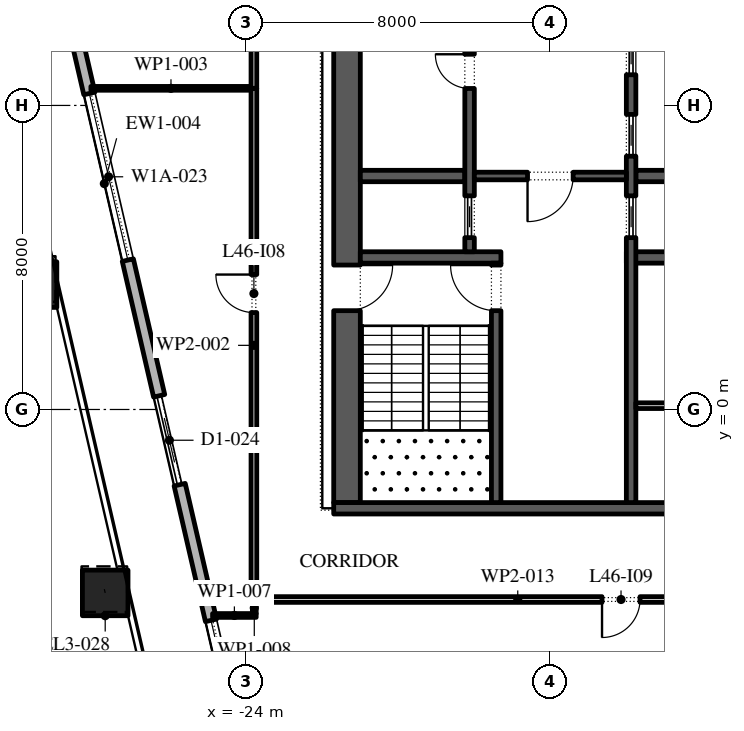
"""IFC4 building model, lengths in metres.
Left out: names, types, materials, properties, quantities, classifications, styles, units other than length and angle.
Written with IfcOpenShell. Run it as: python <this file> out.ifc"""

import sys

from ifc_helpers import new_model, si_unit, direction, frame, frame_2d, origin, origin_2d, place, context, subcontext, project, spatial, rectangle, extrude, element, fill, save


model = new_model("IFC4")
c1 = context("Model", 3, precision=1e-05, world=origin(), true_north=direction((0.0, 1.0)))
c2 = subcontext(c1, "Body", "Model", "MODEL_VIEW")
j1 = project(units=[si_unit("LENGTHUNIT", "METRE"), si_unit("PLANEANGLEUNIT", "RADIAN")], contexts=[c1])
p1 = place(None, origin())
s1 = spatial("IfcSite", under=j1, at=p1, CompositionType="ELEMENT")
p2 = place(p1, origin())
s2 = spatial("IfcBuilding", under=s1, at=p2, CompositionType="ELEMENT")
p3 = place(p2, frame((0.0, 0.0, 209.4)))
s3 = spatial("IfcBuildingStorey", under=s2, at=p3, CompositionType="ELEMENT", Elevation=209.4)
p4 = place(p3, frame((-29.586, 3.286, 0.0), z_axis=(-0.008074278456, 0.035085353866, 0.999351701841), x_axis=(-0.974526982896, -0.224270282488, 0.0)))
e1 = element("IfcColumn", 1, at=p4, inside=s3, PredefinedType="COLUMN", context=c2, shape_type="SweptSolid", body=[
    extrude(rectangle(XDim=1.2, YDim=1.2, at=origin_2d()), origin(), (0.0, 0.0, 1.0), 4.203),
])
p5 = place(p3, frame((-27.713, -4.826, 0.0), z_axis=(-0.005404165525, 0.0233599413, 0.999712512744), x_axis=(-0.974268511785, -0.225390476607, 0.0)))
e2 = element("IfcColumn", 2, at=p5, inside=s3, PredefinedType="COLUMN", context=c2, shape_type="SweptSolid", body=[
    extrude(rectangle(XDim=1.2, YDim=1.2, at=origin_2d()), origin(), (0.0, 0.0, 1.0), 4.201),
])
p6 = place(p3, frame((-33.157, 30.092, 0.0), z_axis=(0.0, 0.0, 1.0), x_axis=(0.224950279389, -0.974370243697, 0.0)))
e3 = element("IfcWall", 3, at=p6, inside=s3, PredefinedType="STANDARD", context=c2, shape_type="SweptSolid", body=[
    extrude(rectangle(XDim=49.5, YDim=0.3, at=frame_2d((24.75, 0.0))), origin(), (0.0, 0.0, 1.0), 4.0),
])
p7 = place(p6, frame((2.207, 0.0, 0.0)))
e4 = element("IfcOpeningElement", 4, at=p7, cuts=e3, PredefinedType="OPENING", context=c2, shape_type="SweptSolid", body=[
    extrude(rectangle(XDim=2.4, YDim=3.5, at=frame_2d((1.2, 1.75))), frame((0.0, 0.16, 0.0), z_axis=(0.0, -1.0, 0.0), x_axis=(1.0, 0.0, 0.0)), (0.0, 0.0, 1.0), 0.32),
])
p8 = place(p6, frame((8.121, 0.0, 0.45)))
e5 = element("IfcOpeningElement", 5, at=p8, cuts=e3, PredefinedType="OPENING", context=c2, shape_type="SweptSolid", body=[
    extrude(rectangle(XDim=4.5, YDim=2.825, at=frame_2d((2.25, 1.413))), frame((0.0, 0.16, 0.0), z_axis=(0.0, -1.0, 0.0), x_axis=(1.0, 0.0, 0.0)), (0.0, 0.0, 1.0), 0.32),
])
p9 = place(p6, frame((15.236, 0.0, 0.45)))
e6 = element("IfcOpeningElement", 6, at=p9, cuts=e3, PredefinedType="OPENING", context=c2, shape_type="SweptSolid", body=[
    extrude(rectangle(XDim=4.5, YDim=2.95, at=frame_2d((2.25, 1.475))), frame((0.0, 0.16, 0.0), z_axis=(0.0, -1.0, 0.0), x_axis=(1.0, 0.0, 0.0)), (0.0, 0.0, 1.0), 0.32),
])
p10 = place(p6, frame((22.35, 0.0, 0.45)))
e7 = element("IfcOpeningElement", 7, at=p10, cuts=e3, PredefinedType="OPENING", context=c2, shape_type="SweptSolid", body=[
    extrude(rectangle(XDim=4.5, YDim=3.0, at=frame_2d((2.25, 1.5))), frame((0.0, 0.16, 0.0), z_axis=(0.0, -1.0, 0.0), x_axis=(1.0, 0.0, 0.0)), (0.0, 0.0, 1.0), 0.32),
])
p11 = place(p6, frame((30.514, 0.0, 0.0)))
e8 = element("IfcOpeningElement", 8, at=p11, cuts=e3, PredefinedType="OPENING", context=c2, shape_type="SweptSolid", body=[
    extrude(rectangle(XDim=2.4, YDim=3.5, at=frame_2d((1.2, 1.75))), frame((0.0, 0.16, 0.0), z_axis=(0.0, -1.0, 0.0), x_axis=(1.0, 0.0, 0.0)), (0.0, 0.0, 1.0), 0.32),
])
p12 = place(p6, frame((36.579, 0.0, 0.45)))
e9 = element("IfcOpeningElement", 9, at=p12, cuts=e3, PredefinedType="OPENING", context=c2, shape_type="SweptSolid", body=[
    extrude(rectangle(XDim=4.5, YDim=3.05, at=frame_2d((2.25, 1.525))), frame((0.0, 0.16, 0.0), z_axis=(0.0, -1.0, 0.0), x_axis=(1.0, 0.0, 0.0)), (0.0, 0.0, 1.0), 0.32),
])
p13 = place(p6, frame((43.693, 0.0, 0.45)))
e10 = element("IfcOpeningElement", 10, at=p13, cuts=e3, PredefinedType="OPENING", context=c2, shape_type="SweptSolid", body=[
    extrude(rectangle(XDim=4.5, YDim=3.05, at=frame_2d((2.25, 1.525))), frame((0.0, 0.16, 0.0), z_axis=(0.0, -1.0, 0.0), x_axis=(1.0, 0.0, 0.0)), (0.0, 0.0, 1.0), 0.32),
])
p14 = place(p3, frame((-21.35, -2.45, 0.0), z_axis=(0.0, 0.0, 1.0), x_axis=(0.0, 1.0, 0.0)))
e11 = element("IfcWall", 11, at=p14, inside=s3, PredefinedType="SHEAR", context=c2, shape_type="SweptSolid", body=[
    extrude(rectangle(XDim=27.9, YDim=0.7, at=frame_2d((13.95, 0.0))), origin(), (0.0, 0.0, 1.0), 4.0),
])
p15 = place(p14, frame((5.05, 0.0, 0.0)))
e12 = element("IfcOpeningElement", 12, at=p15, cuts=e11, PredefinedType="OPENING", context=c2, shape_type="SweptSolid", body=[
    extrude(rectangle(XDim=1.2, YDim=2.1, at=frame_2d((0.6, 1.05))), frame((0.0, 0.36, 0.0), z_axis=(0.0, -1.0, 0.0), x_axis=(1.0, 0.0, 0.0)), (0.0, 0.0, 1.0), 0.72),
])
p16 = place(p14, frame((21.65, 0.0, 0.0)))
e13 = element("IfcOpeningElement", 13, at=p16, cuts=e11, PredefinedType="OPENING", context=c2, shape_type="SweptSolid", body=[
    extrude(rectangle(XDim=1.2, YDim=2.1, at=frame_2d((0.6, 1.05))), frame((0.0, 0.36, 0.0), z_axis=(0.0, -1.0, 0.0), x_axis=(1.0, 0.0, 0.0)), (0.0, 0.0, 1.0), 0.72),
])
p17 = place(p3, frame((-21.7, -2.6, 0.0), z_axis=(0.0, 0.0, 1.0), x_axis=(1.0, 0.0, 0.0)))
e14 = element("IfcWall", 14, at=p17, inside=s3, PredefinedType="SHEAR", context=c2, shape_type="SweptSolid", body=[
    extrude(rectangle(XDim=11.4, YDim=0.3, at=frame_2d((5.7, 0.0))), origin(), (0.0, 0.0, 1.0), 4.0),
])
p18 = place(p3, frame((-21.0, 4.0, 0.0), z_axis=(0.0, 0.0, 1.0), x_axis=(1.0, 0.0, 0.0)))
e15 = element("IfcWall", 15, at=p18, inside=s3, PredefinedType="SHEAR", context=c2, shape_type="SweptSolid", body=[
    extrude(rectangle(XDim=3.7, YDim=0.3, at=frame_2d((1.85, 0.0))), origin(), (0.0, 0.0, 1.0), 4.0),
])
p19 = place(p3, frame((-17.425, -2.45, 0.0), z_axis=(0.0, 0.0, 1.0), x_axis=(0.0, 1.0, 0.0)))
e16 = element("IfcWall", 16, at=p19, inside=s3, PredefinedType="SHEAR", context=c2, shape_type="SweptSolid", body=[
    extrude(rectangle(XDim=6.3, YDim=0.25, at=frame_2d((3.15, 0.0))), origin(), (0.0, 0.0, 1.0), 4.0),
])
p20 = place(p19, frame((5.05, 0.0, 0.0)))
e17 = element("IfcOpeningElement", 17, at=p20, cuts=e16, PredefinedType="OPENING", context=c2, shape_type="SweptSolid", body=[
    extrude(rectangle(XDim=1.2, YDim=2.1, at=frame_2d((0.6, 1.05))), frame((0.0, 0.135, 0.0), z_axis=(0.0, -1.0, 0.0), x_axis=(1.0, 0.0, 0.0)), (0.0, 0.0, 1.0), 0.27),
])
p21 = place(p3, frame((-21.0, 6.143, 0.0), z_axis=(0.0, 0.0, 1.0), x_axis=(1.0, 0.0, 0.0)))
e18 = element("IfcWall", 18, at=p21, inside=s3, PredefinedType="SHEAR", context=c2, shape_type="SweptSolid", body=[
    extrude(rectangle(XDim=2.75, YDim=0.3, at=frame_2d((1.375, 0.0))), origin(), (0.0, 0.0, 1.0), 4.0),
])
p22 = place(p3, frame((-18.125, 4.15, 0.0), z_axis=(0.0, 0.0, 1.0), x_axis=(0.0, 1.0, 0.0)))
e19 = element("IfcWall", 19, at=p22, inside=s3, PredefinedType="SHEAR", context=c2, shape_type="SweptSolid", body=[
    extrude(rectangle(XDim=14.7, YDim=0.25, at=frame_2d((7.35, 0.0))), origin(), (0.0, 0.0, 1.0), 4.0),
])
p23 = place(p22, frame((4.296, 0.0, 0.0)))
e20 = element("IfcOpeningElement", 20, at=p23, cuts=e19, PredefinedType="OPENING", context=c2, shape_type="SweptSolid", body=[
    extrude(rectangle(XDim=0.9, YDim=2.1, at=frame_2d((0.45, 1.05))), frame((0.0, 0.135, 0.0), z_axis=(0.0, -1.0, 0.0), x_axis=(1.0, 0.0, 0.0)), (0.0, 0.0, 1.0), 0.27),
])
p24 = place(p22, frame((9.504, 0.0, 0.0)))
e21 = element("IfcOpeningElement", 21, at=p24, cuts=e19, PredefinedType="OPENING", context=c2, shape_type="SweptSolid", body=[
    extrude(rectangle(XDim=0.9, YDim=2.1, at=frame_2d((0.45, 1.05))), frame((0.0, 0.135, 0.0), z_axis=(0.0, -1.0, 0.0), x_axis=(1.0, 0.0, 0.0)), (0.0, 0.0, 1.0), 0.27),
])
p25 = place(p22, frame((0.371, 0.0, 0.0)))
e22 = element("IfcOpeningElement", 22, at=p25, cuts=e19, PredefinedType="OPENING", context=c2, shape_type="SweptSolid", body=[
    extrude(rectangle(XDim=1.1, YDim=2.1, at=frame_2d((0.55, 1.05))), frame((0.0, 0.135, 0.0), z_axis=(0.0, -1.0, 0.0), x_axis=(1.0, 0.0, 0.0)), (0.0, 0.0, 1.0), 0.27),
])
p26 = place(p22, frame((13.229, 0.0, 0.0)))
e23 = element("IfcOpeningElement", 23, at=p26, cuts=e19, PredefinedType="OPENING", context=c2, shape_type="SweptSolid", body=[
    extrude(rectangle(XDim=1.1, YDim=2.1, at=frame_2d((0.55, 1.05))), frame((0.0, 0.135, 0.0), z_axis=(0.0, -1.0, 0.0), x_axis=(1.0, 0.0, 0.0)), (0.0, 0.0, 1.0), 0.27),
])
p27 = place(p3, frame((-14.0, 4.0, 0.0), z_axis=(0.0, 0.0, 1.0), x_axis=(1.0, 0.0, 0.0)))
e24 = element("IfcWall", 24, at=p27, inside=s3, PredefinedType="SHEAR", context=c2, shape_type="SweptSolid", body=[
    extrude(rectangle(XDim=3.0, YDim=0.3, at=frame_2d((1.5, 0.0))), origin(), (0.0, 0.0, 1.0), 4.0),
])
p28 = place(p3, frame((-13.75, 6.143, 0.0), z_axis=(0.0, 0.0, 1.0), x_axis=(1.0, 0.0, 0.0)))
e25 = element("IfcWall", 25, at=p28, inside=s3, PredefinedType="SHEAR", context=c2, shape_type="SweptSolid", body=[
    extrude(rectangle(XDim=2.75, YDim=0.3, at=frame_2d((1.375, 0.0))), origin(), (0.0, 0.0, 1.0), 4.0),
])
p29 = place(p3, frame((-13.875, -2.45, 0.0), z_axis=(0.0, 0.0, 1.0), x_axis=(0.0, 1.0, 0.0)))
e26 = element("IfcWall", 26, at=p29, inside=s3, PredefinedType="SHEAR", context=c2, shape_type="SweptSolid", body=[
    extrude(rectangle(XDim=21.3, YDim=0.25, at=frame_2d((10.65, 0.0))), origin(), (0.0, 0.0, 1.0), 4.0),
])
p30 = place(p29, frame((17.786, 0.0, 0.0)))
e27 = element("IfcOpeningElement", 27, at=p30, cuts=e26, PredefinedType="OPENING", context=c2, shape_type="SweptSolid", body=[
    extrude(rectangle(XDim=0.9, YDim=2.1, at=frame_2d((0.45, 1.05))), frame((0.0, 0.135, 0.0), z_axis=(0.0, -1.0, 0.0), x_axis=(1.0, 0.0, 0.0)), (0.0, 0.0, 1.0), 0.27),
])
p31 = place(p29, frame((6.971, 0.0, 0.0)))
e28 = element("IfcOpeningElement", 28, at=p31, cuts=e26, PredefinedType="OPENING", context=c2, shape_type="SweptSolid", body=[
    extrude(rectangle(XDim=1.1, YDim=2.1, at=frame_2d((0.55, 1.05))), frame((0.0, 0.135, 0.0), z_axis=(0.0, -1.0, 0.0), x_axis=(1.0, 0.0, 0.0)), (0.0, 0.0, 1.0), 0.27),
])
p32 = place(p29, frame((9.114, 0.0, 0.0)))
e29 = element("IfcOpeningElement", 29, at=p32, cuts=e26, PredefinedType="OPENING", context=c2, shape_type="SweptSolid", body=[
    extrude(rectangle(XDim=1.1, YDim=2.1, at=frame_2d((0.55, 1.05))), frame((0.0, 0.135, 0.0), z_axis=(0.0, -1.0, 0.0), x_axis=(1.0, 0.0, 0.0)), (0.0, 0.0, 1.0), 0.27),
])
p33 = place(p29, frame((11.257, 0.0, 0.0)))
e30 = element("IfcOpeningElement", 30, at=p33, cuts=e26, PredefinedType="OPENING", context=c2, shape_type="SweptSolid", body=[
    extrude(rectangle(XDim=1.1, YDim=2.1, at=frame_2d((0.55, 1.05))), frame((0.0, 0.135, 0.0), z_axis=(0.0, -1.0, 0.0), x_axis=(1.0, 0.0, 0.0)), (0.0, 0.0, 1.0), 0.27),
])
p34 = place(p29, frame((13.4, 0.0, 0.0)))
e31 = element("IfcOpeningElement", 31, at=p34, cuts=e26, PredefinedType="OPENING", context=c2, shape_type="SweptSolid", body=[
    extrude(rectangle(XDim=1.1, YDim=2.1, at=frame_2d((0.55, 1.05))), frame((0.0, 0.135, 0.0), z_axis=(0.0, -1.0, 0.0), x_axis=(1.0, 0.0, 0.0)), (0.0, 0.0, 1.0), 0.27),
])
p35 = place(p3, frame((-18.0, 6.143, 0.0), z_axis=(0.0, 0.0, 1.0), x_axis=(1.0, 0.0, 0.0)))
e32 = element("IfcWall", 32, at=p35, inside=s3, PredefinedType="SHEAR", context=c2, shape_type="SweptSolid", body=[
    extrude(rectangle(XDim=4.0, YDim=0.2, at=frame_2d((2.0, 0.0))), origin(), (0.0, 0.0, 1.0), 4.0),
])
p36 = place(p35, frame((1.4, 0.0, 0.0)))
e33 = element("IfcOpeningElement", 33, at=p36, cuts=e32, PredefinedType="OPENING", context=c2, shape_type="SweptSolid", body=[
    extrude(rectangle(XDim=1.2, YDim=2.1, at=frame_2d((0.6, 1.05))), frame((0.0, 0.11, 0.0), z_axis=(0.0, -1.0, 0.0), x_axis=(1.0, 0.0, 0.0)), (0.0, 0.0, 1.0), 0.22),
])
p37 = place(p3, frame((-13.75, 0.1, 0.0), z_axis=(0.0, 0.0, 1.0), x_axis=(1.0, 0.0, 0.0)))
e34 = element("IfcWall", 34, at=p37, inside=s3, PredefinedType="PARTITIONING", context=c2, shape_type="SweptSolid", body=[
    extrude(rectangle(XDim=2.75, YDim=0.15, at=frame_2d((1.375, 0.0))), origin(), (0.0, 0.0, 1.0), 4.0),
])
p38 = place(p3, frame((-23.8, -5.075, 0.0), z_axis=(0.0, 0.0, 1.0), x_axis=(0.0, 1.0, 0.0)))
e35 = element("IfcWall", 35, at=p38, inside=s3, PredefinedType="PARTITIONING", context=c2, shape_type="SweptSolid", body=[
    extrude(rectangle(XDim=13.525, YDim=0.15, at=frame_2d((6.762, 0.0))), origin(), (0.0, 0.0, 1.0), 4.0),
])
p39 = place(p38, frame((7.625, 0.0, 0.0)))
e36 = element("IfcOpeningElement", 36, at=p39, cuts=e35, PredefinedType="OPENING", context=c2, shape_type="SweptSolid", body=[
    extrude(rectangle(XDim=1.0, YDim=2.1, at=frame_2d((0.5, 1.05))), frame((0.0, 0.085, 0.0), z_axis=(0.0, -1.0, 0.0), x_axis=(1.0, 0.0, 0.0)), (0.0, 0.0, 1.0), 0.17),
])
p40 = place(p3, frame((-23.875, 8.45, 0.0), z_axis=(0.0, 0.0, 1.0), x_axis=(-1.0, 0.0, 0.0)))
e37 = element("IfcWall", 37, at=p40, inside=s3, PredefinedType="PARTITIONING", context=c2, shape_type="SweptSolid", body=[
    extrude(rectangle(XDim=4.214, YDim=0.1, at=frame_2d((2.107, 0.0))), origin(), (0.0, 0.0, 1.0), 4.0),
])
p41 = place(p3, frame((-23.8, 8.45, 0.0), z_axis=(0.0, 0.0, 1.0), x_axis=(0.0, 1.0, 0.0)))
e38 = element("IfcWall", 38, at=p41, inside=s3, PredefinedType="PARTITIONING", context=c2, shape_type="SweptSolid", body=[
    extrude(rectangle(XDim=13.81, YDim=0.15, at=frame_2d((6.905, 0.0))), origin(), (0.0, 0.0, 1.0), 4.0),
])
p42 = place(p41, frame((6.46, 0.0, 0.0)))
e39 = element("IfcOpeningElement", 39, at=p42, cuts=e38, PredefinedType="OPENING", context=c2, shape_type="SweptSolid", body=[
    extrude(rectangle(XDim=1.0, YDim=2.1, at=frame_2d((0.5, 1.05))), frame((0.0, 0.085, 0.0), z_axis=(0.0, -1.0, 0.0), x_axis=(1.0, 0.0, 0.0)), (0.0, 0.0, 1.0), 0.17),
])
p43 = place(p3, frame((-23.74, -5.42, 0.0), z_axis=(0.0, 0.0, 1.0), x_axis=(-1.0, 0.0, 0.0)))
e40 = element("IfcWall", 40, at=p43, inside=s3, PredefinedType="PARTITIONING", context=c2, shape_type="SweptSolid", body=[
    extrude(rectangle(XDim=1.147, YDim=0.1, at=frame_2d((0.573, 0.0))), origin(), (0.0, 0.0, 1.0), 4.0),
])
p44 = place(p3, frame((-23.79, -5.075, 0.0), z_axis=(0.0, 0.0, 1.0), x_axis=(0.0, -1.0, 0.0)))
e41 = element("IfcWall", 41, at=p44, inside=s3, PredefinedType="PARTITIONING", context=c2, shape_type="SweptSolid", body=[
    extrude(rectangle(XDim=0.295, YDim=0.1, at=frame_2d((0.147, 0.0))), origin(), (0.0, 0.0, 1.0), 4.0),
])
p45 = place(p3, frame((-10.0, -5.0, 0.0), z_axis=(0.0, 0.0, 1.0), x_axis=(-1.0, 0.0, 0.0)))
e42 = element("IfcWall", 42, at=p45, inside=s3, PredefinedType="PARTITIONING", context=c2, shape_type="SweptSolid", body=[
    extrude(rectangle(XDim=13.715, YDim=0.15, at=frame_2d((6.857, 0.0))), origin(), (0.0, 0.0, 1.0), 4.0),
])
p46 = place(p45, frame((3.64, 0.0, 0.0)))
e43 = element("IfcOpeningElement", 43, at=p46, cuts=e42, PredefinedType="OPENING", context=c2, shape_type="SweptSolid", body=[
    extrude(rectangle(XDim=1.0, YDim=2.1, at=frame_2d((0.5, 1.05))), frame((0.0, 0.085, 0.0), z_axis=(0.0, -1.0, 0.0), x_axis=(1.0, 0.0, 0.0)), (0.0, 0.0, 1.0), 0.17),
])
p47 = place(p10, origin())
e44 = element("IfcWindow", 44, at=p47, inside=s3, PartitioningType="DOUBLE_PANEL_VERTICAL", PredefinedType="WINDOW", context=c2, shape_type="SweptSolid", body=[
    extrude(rectangle(XDim=4.5, YDim=3.0, at=frame_2d((2.25, 1.5))), frame((0.0, 0.03, 0.0), z_axis=(0.0, -1.0, 0.0), x_axis=(1.0, 0.0, 0.0)), (0.0, 0.0, 1.0), 0.06),
])
fill(e7, e44)
p48 = place(p11, origin())
e45 = element("IfcDoor", 45, at=p48, inside=s3, OperationType="DOUBLE_DOOR_SLIDING", PredefinedType="DOOR", context=c2, shape_type="SweptSolid", body=[
    extrude(rectangle(XDim=2.4, YDim=3.5, at=frame_2d((1.2, 1.75))), frame((0.0, 0.025, 0.0), z_axis=(0.0, -1.0, 0.0), x_axis=(1.0, 0.0, 0.0)), (0.0, 0.0, 1.0), 0.05),
])
fill(e8, e45)
p49 = place(p12, origin())
e46 = element("IfcWindow", 46, at=p49, inside=s3, PartitioningType="DOUBLE_PANEL_VERTICAL", PredefinedType="WINDOW", context=c2, shape_type="SweptSolid", body=[
    extrude(rectangle(XDim=4.5, YDim=3.05, at=frame_2d((2.25, 1.525))), frame((0.0, 0.03, 0.0), z_axis=(0.0, -1.0, 0.0), x_axis=(1.0, 0.0, 0.0)), (0.0, 0.0, 1.0), 0.06),
])
fill(e9, e46)
p50 = place(p23, origin())
e47 = element("IfcDoor", 47, at=p50, inside=s3, OperationType="SINGLE_SWING_LEFT", PredefinedType="DOOR", context=c2, shape_type="SweptSolid", body=[
    extrude(rectangle(XDim=0.9, YDim=2.1, at=frame_2d((0.45, 1.05))), frame((0.0, 0.125, 0.0), z_axis=(0.0, -1.0, 0.0), x_axis=(1.0, 0.0, 0.0)), (0.0, 0.0, 1.0), 0.05),
])
fill(e20, e47)
p51 = place(p25, origin())
e48 = element("IfcDoor", 48, at=p51, inside=s3, OperationType="SLIDING_TO_LEFT", PredefinedType="DOOR", context=c2, shape_type="SweptSolid", body=[
    extrude(rectangle(XDim=1.1, YDim=2.1, at=frame_2d((0.55, 1.05))), frame((0.0, 0.025, 0.0), z_axis=(0.0, -1.0, 0.0), x_axis=(1.0, 0.0, 0.0)), (0.0, 0.0, 1.0), 0.05),
])
fill(e22, e48)
p52 = place(p31, origin())
e49 = element("IfcDoor", 49, at=p52, inside=s3, OperationType="SLIDING_TO_LEFT", PredefinedType="DOOR", context=c2, shape_type="SweptSolid", body=[
    extrude(rectangle(XDim=1.1, YDim=2.1, at=frame_2d((0.55, 1.05))), frame((0.0, 0.025, 0.0), z_axis=(0.0, -1.0, 0.0), x_axis=(1.0, 0.0, 0.0)), (0.0, 0.0, 1.0), 0.05),
])
fill(e28, e49)
p53 = place(p32, origin())
e50 = element("IfcDoor", 50, at=p53, inside=s3, OperationType="SLIDING_TO_LEFT", PredefinedType="DOOR", context=c2, shape_type="SweptSolid", body=[
    extrude(rectangle(XDim=1.1, YDim=2.1, at=frame_2d((0.55, 1.05))), frame((0.0, 0.025, 0.0), z_axis=(0.0, -1.0, 0.0), x_axis=(1.0, 0.0, 0.0)), (0.0, 0.0, 1.0), 0.05),
])
fill(e29, e50)
p54 = place(p33, origin())
e51 = element("IfcDoor", 51, at=p54, inside=s3, OperationType="SLIDING_TO_LEFT", PredefinedType="DOOR", context=c2, shape_type="SweptSolid", body=[
    extrude(rectangle(XDim=1.1, YDim=2.1, at=frame_2d((0.55, 1.05))), frame((0.0, 0.025, 0.0), z_axis=(0.0, -1.0, 0.0), x_axis=(1.0, 0.0, 0.0)), (0.0, 0.0, 1.0), 0.05),
])
fill(e30, e51)
p55 = place(p36, frame((1.2, 0.0, 0.0), z_axis=(0.0, 0.0, 1.0), x_axis=(-1.0, 0.0, 0.0)))
e52 = element("IfcDoor", 52, at=p55, inside=s3, OperationType="SINGLE_SWING_LEFT", PredefinedType="DOOR", context=c2, shape_type="SweptSolid", body=[
    extrude(rectangle(XDim=1.2, YDim=2.1, at=frame_2d((0.6, 1.05))), frame((0.0, 0.025, 0.0), z_axis=(0.0, -1.0, 0.0), x_axis=(1.0, 0.0, 0.0)), (0.0, 0.0, 1.0), 0.05),
])
fill(e33, e52)
p56 = place(p20, origin())
e53 = element("IfcDoor", 53, at=p56, inside=s3, OperationType="SINGLE_SWING_LEFT", PredefinedType="DOOR", context=c2, shape_type="SweptSolid", body=[
    extrude(rectangle(XDim=1.2, YDim=2.1, at=frame_2d((0.6, 1.05))), frame((0.0, 0.025, 0.0), z_axis=(0.0, -1.0, 0.0), x_axis=(1.0, 0.0, 0.0)), (0.0, 0.0, 1.0), 0.05),
])
fill(e17, e53)
p57 = place(p15, frame((1.2, 0.0, 0.0), z_axis=(0.0, 0.0, 1.0), x_axis=(-1.0, 0.0, 0.0)))
e54 = element("IfcDoor", 54, at=p57, inside=s3, OperationType="SINGLE_SWING_RIGHT", PredefinedType="DOOR", context=c2, shape_type="SweptSolid", body=[
    extrude(rectangle(XDim=1.2, YDim=2.1, at=frame_2d((0.6, 1.05))), frame((0.0, 0.025, 0.0), z_axis=(0.0, -1.0, 0.0), x_axis=(1.0, 0.0, 0.0)), (0.0, 0.0, 1.0), 0.05),
])
fill(e12, e54)
p58 = place(p39, origin())
e55 = element("IfcDoor", 55, at=p58, inside=s3, OperationType="SINGLE_SWING_LEFT", PredefinedType="DOOR", context=c2, shape_type="SweptSolid", body=[
    extrude(rectangle(XDim=1.0, YDim=2.1, at=frame_2d((0.5, 1.05))), frame((0.0, 0.025, 0.0), z_axis=(0.0, -1.0, 0.0), x_axis=(1.0, 0.0, 0.0)), (0.0, 0.0, 1.0), 0.05),
])
fill(e36, e55)
p59 = place(p46, origin())
e56 = element("IfcDoor", 56, at=p59, inside=s3, OperationType="SINGLE_SWING_LEFT", PredefinedType="DOOR", context=c2, shape_type="SweptSolid", body=[
    extrude(rectangle(XDim=1.0, YDim=2.1, at=frame_2d((0.5, 1.05))), frame((0.0, 0.025, 0.0), z_axis=(0.0, -1.0, 0.0), x_axis=(1.0, 0.0, 0.0)), (0.0, 0.0, 1.0), 0.05),
])
fill(e43, e56)
save(model, sys.argv[1])
